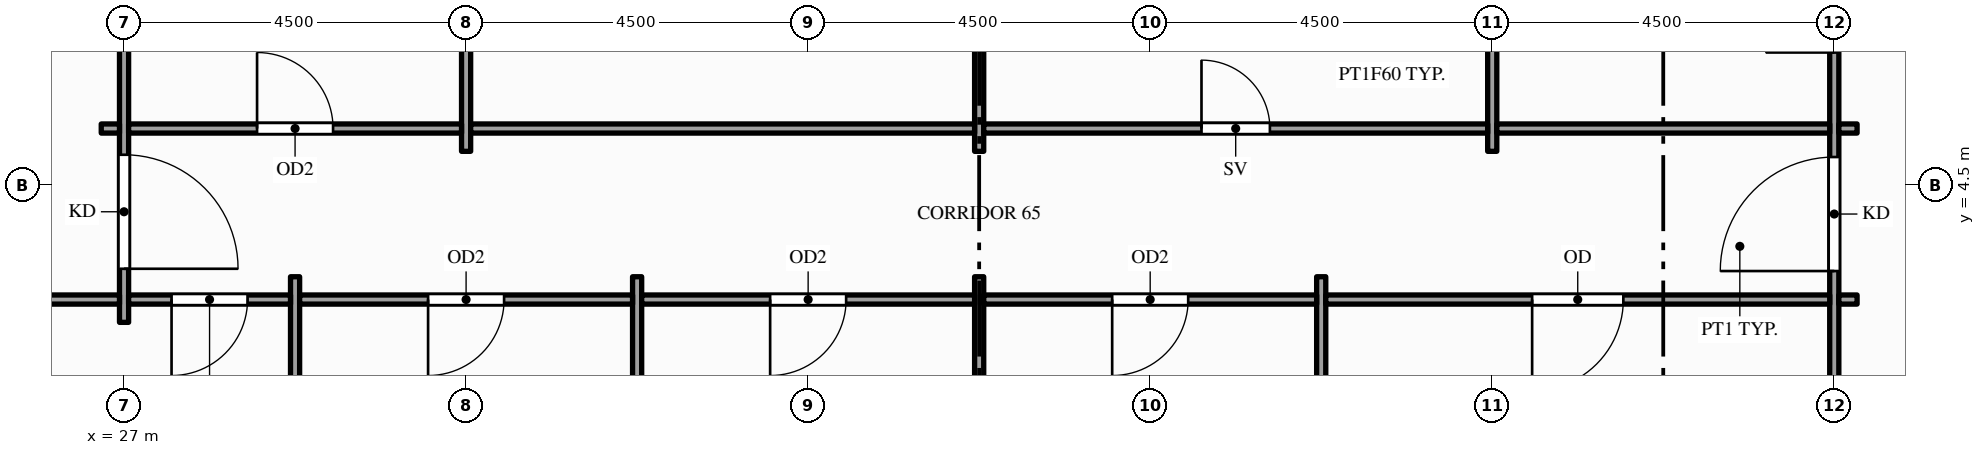
"""IFC4 building model, lengths in metres.
Left out: names, types, materials, properties, quantities, classifications, styles, units other than length and angle.
Written with IfcOpenShell. Run it as: python <this file> out.ifc"""

import sys

from ifc_helpers import new_model, si_unit, direction, frame, frame_2d, origin, place, context, subcontext, project, spatial, rectangle, extrude, element, fill, save


model = new_model("IFC4")
c1 = context("Model", 3, precision=1e-05, world=origin(), true_north=direction((0.0, 1.0)))
c2 = subcontext(c1, "Body", "Model", "MODEL_VIEW")
j1 = project(units=[si_unit("LENGTHUNIT", "METRE"), si_unit("PLANEANGLEUNIT", "RADIAN")], contexts=[c1])
p1 = place(None, origin())
s1 = spatial("IfcSite", under=j1, at=p1, CompositionType="ELEMENT")
p2 = place(p1, origin())
s2 = spatial("IfcBuilding", under=s1, at=p2, CompositionType="ELEMENT")
p3 = place(p2, frame((0.0, 0.0, 223.0)))
s3 = spatial("IfcBuildingStorey", under=s2, at=p3, CompositionType="ELEMENT", Elevation=223.0)
p4 = place(p3, frame((27.0, 2.7, 0.0), z_axis=(0.0, 0.0, 1.0), x_axis=(0.0, 1.0, 0.0)))
e1 = element("IfcWall", 1, at=p4, inside=s3, PredefinedType="PARTITIONING", context=c2, shape_type="SweptSolid", body=[
    extrude(rectangle(XDim=14.1, YDim=0.12, at=frame_2d((7.05, 0.0))), origin(), (0.0, 0.0, 1.0), 2.87),
])
p5 = place(p4, frame((0.705, 0.0, 0.0)))
e2 = element("IfcOpeningElement", 2, at=p5, cuts=e1, PredefinedType="OPENING", context=c2, shape_type="SweptSolid", body=[
    extrude(rectangle(XDim=1.5, YDim=2.1, at=frame_2d((0.75, 1.05))), frame((0.0, 0.07, 0.0), z_axis=(0.0, -1.0, 0.0), x_axis=(1.0, 0.0, 0.0)), (0.0, 0.0, 1.0), 0.14),
])
p6 = place(p4, frame((11.895, 0.0, 0.0)))
e3 = element("IfcOpeningElement", 3, at=p6, cuts=e1, PredefinedType="OPENING", context=c2, shape_type="SweptSolid", body=[
    extrude(rectangle(XDim=1.5, YDim=2.1, at=frame_2d((0.75, 1.05))), frame((0.0, 0.07, 0.0), z_axis=(0.0, -1.0, 0.0), x_axis=(1.0, 0.0, 0.0)), (0.0, 0.0, 1.0), 0.14),
])
p7 = place(p3, frame((29.25, -1.35, 0.0), z_axis=(0.0, 0.0, 1.0), x_axis=(0.0, 1.0, 0.0)))
e4 = element("IfcWall", 4, at=p7, inside=s3, PredefinedType="PARTITIONING", context=c2, shape_type="SweptSolid", body=[
    extrude(rectangle(XDim=4.65, YDim=0.12, at=frame_2d((2.325, 0.0))), origin(), (0.0, 0.0, 1.0), 2.87),
])
p8 = place(p3, frame((31.5, 4.95, 0.0), z_axis=(0.0, 0.0, 1.0), x_axis=(0.0, 1.0, 0.0)))
e5 = element("IfcWall", 5, at=p8, inside=s3, PredefinedType="PARTITIONING", context=c2, shape_type="SweptSolid", body=[
    extrude(rectangle(XDim=9.6, YDim=0.12, at=frame_2d((4.8, 0.0))), origin(), (0.0, 0.0, 1.0), 2.87),
])
for number, where, z_axis, x_axis in (
    (6, (33.75, -1.35, 0.0), (0.0, 0.0, 1.0), (0.0, 1.0, 0.0)),
    (7, (38.25, -1.35, 0.0), (0.0, 0.0, 1.0), (0.0, 1.0, 0.0)),
):
    element("IfcWall", number, at=place(p3, frame(where, z_axis=z_axis, x_axis=x_axis)), inside=s3, PredefinedType="PARTITIONING", context=c2, shape_type="SweptSolid", body=[
        extrude(rectangle(XDim=4.65, YDim=0.12, at=frame_2d((2.325, 0.0))), origin(), (0.0, 0.0, 1.0), 2.87),
    ])
p9 = place(p3, frame((38.25, 4.95, 0.0), z_axis=(0.0, 0.0, 1.0), x_axis=(0.0, 1.0, 0.0)))
e8 = element("IfcWall", 8, at=p9, inside=s3, PredefinedType="PARTITIONING", context=c2, shape_type="SweptSolid", body=[
    extrude(rectangle(XDim=9.6, YDim=0.12, at=frame_2d((4.8, 0.0))), origin(), (0.0, 0.0, 1.0), 2.87),
])
p10 = place(p3, frame((42.75, -1.35, 0.0), z_axis=(0.0, 0.0, 1.0), x_axis=(0.0, 1.0, 0.0)))
e9 = element("IfcWall", 9, at=p10, inside=s3, PredefinedType="PARTITIONING", context=c2, shape_type="SweptSolid", body=[
    extrude(rectangle(XDim=4.65, YDim=0.12, at=frame_2d((2.325, 0.0))), origin(), (0.0, 0.0, 1.0), 2.87),
])
p11 = place(p3, frame((45.0, 4.95, 0.0), z_axis=(0.0, 0.0, 1.0), x_axis=(0.0, 1.0, 0.0)))
e10 = element("IfcWall", 10, at=p11, inside=s3, PredefinedType="PARTITIONING", context=c2, shape_type="SweptSolid", body=[
    extrude(rectangle(XDim=9.6, YDim=0.12, at=frame_2d((4.8, 0.0))), origin(), (0.0, 0.0, 1.0), 2.87),
])
p12 = place(p3, frame((49.5, -1.35, 0.0), z_axis=(0.0, 0.0, 1.0), x_axis=(0.0, 1.0, 0.0)))
e11 = element("IfcWall", 11, at=p12, inside=s3, PredefinedType="PARTITIONING", context=c2, shape_type="SweptSolid", body=[
    extrude(rectangle(XDim=22.2, YDim=0.12, at=frame_2d((11.1, 0.0))), origin(), (0.0, 0.0, 1.0), 2.87),
])
p13 = place(p12, frame((4.725, 0.0, 0.0)))
e12 = element("IfcOpeningElement", 12, at=p13, cuts=e11, PredefinedType="OPENING", context=c2, shape_type="SweptSolid", body=[
    extrude(rectangle(XDim=1.5, YDim=2.1, at=frame_2d((0.75, 1.05))), frame((0.0, 0.07, 0.0), z_axis=(0.0, -1.0, 0.0), x_axis=(1.0, 0.0, 0.0)), (0.0, 0.0, 1.0), 0.14),
])
p14 = place(p12, frame((15.975, 0.0, 0.0)))
e13 = element("IfcOpeningElement", 13, at=p14, cuts=e11, PredefinedType="OPENING", context=c2, shape_type="SweptSolid", body=[
    extrude(rectangle(XDim=1.5, YDim=2.1, at=frame_2d((0.75, 1.05))), frame((0.0, 0.07, 0.0), z_axis=(0.0, -1.0, 0.0), x_axis=(1.0, 0.0, 0.0)), (0.0, 0.0, 1.0), 0.14),
])
p15 = place(p12, frame((7.6, 0.0, 0.0)))
e14 = element("IfcOpeningElement", 14, at=p15, cuts=e11, PredefinedType="OPENING", context=c2, shape_type="SweptSolid", body=[
    extrude(rectangle(XDim=0.9, YDim=2.1, at=frame_2d((0.45, 1.05))), frame((0.0, 0.07, 0.0), z_axis=(0.0, -1.0, 0.0), x_axis=(1.0, 0.0, 0.0)), (0.0, 0.0, 1.0), 0.14),
])
p16 = place(p12, frame((10.65, 0.0, 0.0)))
e15 = element("IfcOpeningElement", 15, at=p16, cuts=e11, PredefinedType="OPENING", context=c2, shape_type="SweptSolid", body=[
    extrude(rectangle(XDim=0.9, YDim=2.1, at=frame_2d((0.45, 1.05))), frame((0.0, 0.07, 0.0), z_axis=(0.0, -1.0, 0.0), x_axis=(1.0, 0.0, 0.0)), (0.0, 0.0, 1.0), 0.14),
])
p17 = place(p12, frame((13.6, 0.0, 0.0)))
e16 = element("IfcOpeningElement", 16, at=p17, cuts=e11, PredefinedType="OPENING", context=c2, shape_type="SweptSolid", body=[
    extrude(rectangle(XDim=1.0, YDim=2.1, at=frame_2d((0.5, 1.05))), frame((0.0, 0.07, 0.0), z_axis=(0.0, -1.0, 0.0), x_axis=(1.0, 0.0, 0.0)), (0.0, 0.0, 1.0), 0.14),
])
p18 = place(p3, frame((24.81, 3.0, 0.0), z_axis=(0.0, 0.0, 1.0), x_axis=(1.0, 0.0, 0.0)))
e17 = element("IfcWall", 17, at=p18, inside=s3, PredefinedType="PARTITIONING", context=c2, shape_type="SweptSolid", body=[
    extrude(rectangle(XDim=2.13, YDim=0.12, at=frame_2d((1.065, 0.0))), origin(), (0.0, 0.0, 1.0), 2.76),
])
p19 = place(p3, frame((27.06, 3.0, 0.0), z_axis=(0.0, 0.0, 1.0), x_axis=(1.0, 0.0, 0.0)))
e18 = element("IfcWall", 18, at=p19, inside=s3, PredefinedType="PARTITIONING", context=c2, shape_type="SweptSolid", body=[
    extrude(rectangle(XDim=2.13, YDim=0.12, at=frame_2d((1.065, 0.0))), origin(), (0.0, 0.0, 1.0), 2.87),
])
p20 = place(p19, frame((0.565, 0.0, 0.0)))
e19 = element("IfcOpeningElement", 19, at=p20, cuts=e18, PredefinedType="OPENING", context=c2, shape_type="SweptSolid", body=[
    extrude(rectangle(XDim=1.0, YDim=2.1, at=frame_2d((0.5, 1.05))), frame((0.0, 0.07, 0.0), z_axis=(0.0, -1.0, 0.0), x_axis=(1.0, 0.0, 0.0)), (0.0, 0.0, 1.0), 0.14),
])
p21 = place(p3, frame((29.31, 3.0, 0.0), z_axis=(0.0, 0.0, 1.0), x_axis=(1.0, 0.0, 0.0)))
e20 = element("IfcWall", 20, at=p21, inside=s3, PredefinedType="PARTITIONING", context=c2, shape_type="SweptSolid", body=[
    extrude(rectangle(XDim=4.38, YDim=0.12, at=frame_2d((2.19, 0.0))), origin(), (0.0, 0.0, 1.0), 2.87),
])
p22 = place(p21, frame((1.69, 0.0, 0.0)))
e21 = element("IfcOpeningElement", 21, at=p22, cuts=e20, PredefinedType="OPENING", context=c2, shape_type="SweptSolid", body=[
    extrude(rectangle(XDim=1.0, YDim=2.1, at=frame_2d((0.5, 1.05))), frame((0.0, 0.07, 0.0), z_axis=(0.0, -1.0, 0.0), x_axis=(1.0, 0.0, 0.0)), (0.0, 0.0, 1.0), 0.14),
])
p23 = place(p3, frame((33.81, 3.0, 0.0), z_axis=(0.0, 0.0, 1.0), x_axis=(1.0, 0.0, 0.0)))
e22 = element("IfcWall", 22, at=p23, inside=s3, PredefinedType="PARTITIONING", context=c2, shape_type="SweptSolid", body=[
    extrude(rectangle(XDim=4.38, YDim=0.12, at=frame_2d((2.19, 0.0))), origin(), (0.0, 0.0, 1.0), 2.87),
])
p24 = place(p23, frame((1.69, 0.0, 0.0)))
e23 = element("IfcOpeningElement", 23, at=p24, cuts=e22, PredefinedType="OPENING", context=c2, shape_type="SweptSolid", body=[
    extrude(rectangle(XDim=1.0, YDim=2.1, at=frame_2d((0.5, 1.05))), frame((0.0, 0.07, 0.0), z_axis=(0.0, -1.0, 0.0), x_axis=(1.0, 0.0, 0.0)), (0.0, 0.0, 1.0), 0.14),
])
p25 = place(p3, frame((38.31, 3.0, 0.0), z_axis=(0.0, 0.0, 1.0), x_axis=(1.0, 0.0, 0.0)))
e24 = element("IfcWall", 24, at=p25, inside=s3, PredefinedType="PARTITIONING", context=c2, shape_type="SweptSolid", body=[
    extrude(rectangle(XDim=4.38, YDim=0.12, at=frame_2d((2.19, 0.0))), origin(), (0.0, 0.0, 1.0), 2.87),
])
p26 = place(p25, frame((1.69, 0.0, 0.0)))
e25 = element("IfcOpeningElement", 25, at=p26, cuts=e24, PredefinedType="OPENING", context=c2, shape_type="SweptSolid", body=[
    extrude(rectangle(XDim=1.0, YDim=2.1, at=frame_2d((0.5, 1.05))), frame((0.0, 0.07, 0.0), z_axis=(0.0, -1.0, 0.0), x_axis=(1.0, 0.0, 0.0)), (0.0, 0.0, 1.0), 0.14),
])
p27 = place(p3, frame((42.81, 3.0, 0.0), z_axis=(0.0, 0.0, 1.0), x_axis=(1.0, 0.0, 0.0)))
e26 = element("IfcWall", 26, at=p27, inside=s3, PredefinedType="PARTITIONING", context=c2, shape_type="SweptSolid", body=[
    extrude(rectangle(XDim=6.63, YDim=0.12, at=frame_2d((3.315, 0.0))), origin(), (0.0, 0.0, 1.0), 2.87),
])
p28 = place(p27, frame((2.715, 0.0, 0.0)))
e27 = element("IfcOpeningElement", 27, at=p28, cuts=e26, PredefinedType="OPENING", context=c2, shape_type="SweptSolid", body=[
    extrude(rectangle(XDim=1.2, YDim=2.1, at=frame_2d((0.6, 1.05))), frame((0.0, 0.07, 0.0), z_axis=(0.0, -1.0, 0.0), x_axis=(1.0, 0.0, 0.0)), (0.0, 0.0, 1.0), 0.14),
])
for number, where, z_axis, x_axis in (
    (28, (49.56, 3.0, 0.0), (0.0, 0.0, 1.0), (1.0, 0.0, 0.0)),
    (29, (26.7, 5.25, 0.0), (0.0, 0.0, 1.0), (1.0, 0.0, 0.0)),
):
    element("IfcWall", number, at=place(p3, frame(where, z_axis=z_axis, x_axis=x_axis)), inside=s3, PredefinedType="PARTITIONING", context=c2, shape_type="SweptSolid", body=[
        extrude(rectangle(XDim=0.24, YDim=0.12, at=frame_2d((0.12, 0.0))), origin(), (0.0, 0.0, 1.0), 2.87),
    ])
p29 = place(p3, frame((27.06, 5.25, 0.0), z_axis=(0.0, 0.0, 1.0), x_axis=(1.0, 0.0, 0.0)))
e30 = element("IfcWall", 30, at=p29, inside=s3, PredefinedType="PARTITIONING", context=c2, shape_type="SweptSolid", body=[
    extrude(rectangle(XDim=4.38, YDim=0.12, at=frame_2d((2.19, 0.0))), origin(), (0.0, 0.0, 1.0), 2.87),
])
p30 = place(p29, frame((1.69, 0.0, 0.0)))
e31 = element("IfcOpeningElement", 31, at=p30, cuts=e30, PredefinedType="OPENING", context=c2, shape_type="SweptSolid", body=[
    extrude(rectangle(XDim=1.0, YDim=2.1, at=frame_2d((0.5, 1.05))), frame((0.0, 0.07, 0.0), z_axis=(0.0, -1.0, 0.0), x_axis=(1.0, 0.0, 0.0)), (0.0, 0.0, 1.0), 0.14),
])
p31 = place(p3, frame((31.56, 5.25, 0.0), z_axis=(0.0, 0.0, 1.0), x_axis=(1.0, 0.0, 0.0)))
e32 = element("IfcWall", 32, at=p31, inside=s3, PredefinedType="PARTITIONING", context=c2, shape_type="SweptSolid", body=[
    extrude(rectangle(XDim=6.63, YDim=0.12, at=frame_2d((3.315, 0.0))), origin(), (0.0, 0.0, 1.0), 2.87),
])
p32 = place(p3, frame((38.31, 5.25, 0.0), z_axis=(0.0, 0.0, 1.0), x_axis=(1.0, 0.0, 0.0)))
e33 = element("IfcWall", 33, at=p32, inside=s3, PredefinedType="PARTITIONING", context=c2, shape_type="SweptSolid", body=[
    extrude(rectangle(XDim=6.63, YDim=0.12, at=frame_2d((3.315, 0.0))), origin(), (0.0, 0.0, 1.0), 2.87),
])
p33 = place(p32, frame((2.865, 0.0, 0.0)))
e34 = element("IfcOpeningElement", 34, at=p33, cuts=e33, PredefinedType="OPENING", context=c2, shape_type="SweptSolid", body=[
    extrude(rectangle(XDim=0.9, YDim=2.1, at=frame_2d((0.45, 1.05))), frame((0.0, 0.07, 0.0), z_axis=(0.0, -1.0, 0.0), x_axis=(1.0, 0.0, 0.0)), (0.0, 0.0, 1.0), 0.14),
])
p34 = place(p3, frame((45.06, 5.25, 0.0), z_axis=(0.0, 0.0, 1.0), x_axis=(1.0, 0.0, 0.0)))
e35 = element("IfcWall", 35, at=p34, inside=s3, PredefinedType="PARTITIONING", context=c2, shape_type="SweptSolid", body=[
    extrude(rectangle(XDim=4.38, YDim=0.12, at=frame_2d((2.19, 0.0))), origin(), (0.0, 0.0, 1.0), 2.87),
])
p35 = place(p3, frame((49.56, 5.25, 0.0), z_axis=(0.0, 0.0, 1.0), x_axis=(1.0, 0.0, 0.0)))
e36 = element("IfcWall", 36, at=p35, inside=s3, PredefinedType="PARTITIONING", context=c2, shape_type="SweptSolid", body=[
    extrude(rectangle(XDim=0.24, YDim=0.12, at=frame_2d((0.12, 0.0))), origin(), (0.0, 0.0, 1.0), 2.87),
])
p36 = place(p5, origin())
e37 = element("IfcDoor", 37, at=p36, inside=s3, OperationType="SINGLE_SWING_LEFT", PredefinedType="DOOR", context=c2, shape_type="SweptSolid", body=[
    extrude(rectangle(XDim=1.5, YDim=2.1, at=frame_2d((0.75, 1.05))), frame((0.0, 0.025, 0.0), z_axis=(0.0, -1.0, 0.0), x_axis=(1.0, 0.0, 0.0)), (0.0, 0.0, 1.0), 0.05),
])
fill(e2, e37)
p37 = place(p13, origin())
e38 = element("IfcDoor", 38, at=p37, inside=s3, OperationType="SINGLE_SWING_LEFT", PredefinedType="DOOR", context=c2, shape_type="SweptSolid", body=[
    extrude(rectangle(XDim=1.5, YDim=2.1, at=frame_2d((0.75, 1.05))), frame((0.0, 0.025, 0.0), z_axis=(0.0, -1.0, 0.0), x_axis=(1.0, 0.0, 0.0)), (0.0, 0.0, 1.0), 0.05),
])
fill(e12, e38)
p38 = place(p30, origin())
e39 = element("IfcDoor", 39, at=p38, inside=s3, OperationType="SINGLE_SWING_LEFT", PredefinedType="DOOR", context=c2, shape_type="SweptSolid", body=[
    extrude(rectangle(XDim=1.0, YDim=2.1, at=frame_2d((0.5, 1.05))), frame((0.0, 0.025, 0.0), z_axis=(0.0, -1.0, 0.0), x_axis=(1.0, 0.0, 0.0)), (0.0, 0.0, 1.0), 0.05),
])
fill(e31, e39)
p39 = place(p33, origin())
e40 = element("IfcDoor", 40, at=p39, inside=s3, OperationType="SINGLE_SWING_LEFT", PredefinedType="DOOR", context=c2, shape_type="SweptSolid", body=[
    extrude(rectangle(XDim=0.9, YDim=2.1, at=frame_2d((0.45, 1.05))), frame((0.0, 0.025, 0.0), z_axis=(0.0, -1.0, 0.0), x_axis=(1.0, 0.0, 0.0)), (0.0, 0.0, 1.0), 0.05),
])
fill(e34, e40)
p40 = place(p20, origin())
e41 = element("IfcDoor", 41, at=p40, inside=s3, OperationType="SINGLE_SWING_LEFT", PredefinedType="DOOR", context=c2, shape_type="SweptSolid", body=[
    extrude(rectangle(XDim=1.0, YDim=2.1, at=frame_2d((0.5, 1.05))), frame((0.0, 0.025, 0.0), z_axis=(0.0, -1.0, 0.0), x_axis=(1.0, 0.0, 0.0)), (0.0, 0.0, 1.0), 0.05),
])
fill(e19, e41)
p41 = place(p22, origin())
e42 = element("IfcDoor", 42, at=p41, inside=s3, OperationType="SINGLE_SWING_LEFT", PredefinedType="DOOR", context=c2, shape_type="SweptSolid", body=[
    extrude(rectangle(XDim=1.0, YDim=2.1, at=frame_2d((0.5, 1.05))), frame((0.0, 0.025, 0.0), z_axis=(0.0, -1.0, 0.0), x_axis=(1.0, 0.0, 0.0)), (0.0, 0.0, 1.0), 0.05),
])
fill(e21, e42)
p42 = place(p24, origin())
e43 = element("IfcDoor", 43, at=p42, inside=s3, OperationType="SINGLE_SWING_LEFT", PredefinedType="DOOR", context=c2, shape_type="SweptSolid", body=[
    extrude(rectangle(XDim=1.0, YDim=2.1, at=frame_2d((0.5, 1.05))), frame((0.0, 0.025, 0.0), z_axis=(0.0, -1.0, 0.0), x_axis=(1.0, 0.0, 0.0)), (0.0, 0.0, 1.0), 0.05),
])
fill(e23, e43)
p43 = place(p26, origin())
e44 = element("IfcDoor", 44, at=p43, inside=s3, OperationType="SINGLE_SWING_LEFT", PredefinedType="DOOR", context=c2, shape_type="SweptSolid", body=[
    extrude(rectangle(XDim=1.0, YDim=2.1, at=frame_2d((0.5, 1.05))), frame((0.0, 0.025, 0.0), z_axis=(0.0, -1.0, 0.0), x_axis=(1.0, 0.0, 0.0)), (0.0, 0.0, 1.0), 0.05),
])
fill(e25, e44)
p44 = place(p28, origin())
e45 = element("IfcDoor", 45, at=p44, inside=s3, OperationType="SINGLE_SWING_LEFT", PredefinedType="DOOR", context=c2, shape_type="SweptSolid", body=[
    extrude(rectangle(XDim=1.2, YDim=2.1, at=frame_2d((0.6, 1.05))), frame((0.0, 0.025, 0.0), z_axis=(0.0, -1.0, 0.0), x_axis=(1.0, 0.0, 0.0)), (0.0, 0.0, 1.0), 0.05),
])
fill(e27, e45)
save(model, sys.argv[1])
